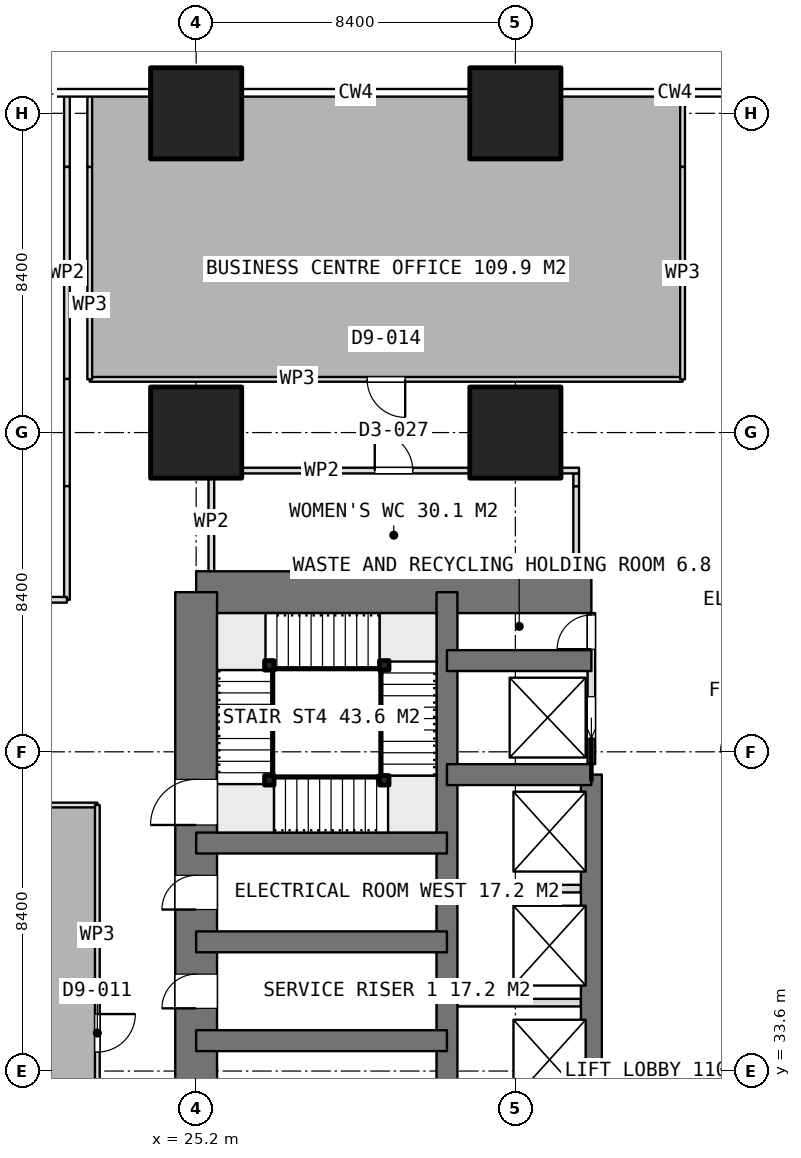
"""IFC4 building model, lengths in metres.
Left out: names, types, materials, properties, quantities, classifications, styles, units other than length and angle.
Written with IfcOpenShell. Run it as: python <this file> out.ifc"""

import sys

from ifc_helpers import new_model, si_unit, direction, frame, frame_2d, origin, origin_2d, place, context, subcontext, project, spatial, rectangle, extrude, element, fill, save


model = new_model("IFC4")
c1 = context("Model", 3, precision=1e-05, world=origin(), true_north=direction((0.0, 1.0)))
c2 = subcontext(c1, "Body", "Model", "MODEL_VIEW")
j1 = project(units=[si_unit("LENGTHUNIT", "METRE"), si_unit("PLANEANGLEUNIT", "RADIAN")], contexts=[c1])
p1 = place(None, origin())
s1 = spatial("IfcSite", under=j1, at=p1, CompositionType="ELEMENT")
p2 = place(p1, origin())
s2 = spatial("IfcBuilding", under=s1, at=p2, CompositionType="ELEMENT")
p3 = place(p2, frame((0.0, 0.0, 20.4)))
s3 = spatial("IfcBuildingStorey", under=s2, at=p3, CompositionType="ELEMENT", Elevation=20.4)
p4 = place(p3, frame((25.2, 46.2, 0.0), z_axis=(0.0, 0.0, 1.0), x_axis=(1.0, 0.0, 0.0)))
e1 = element("IfcWall", 1, at=p4, inside=s3, PredefinedType="SHEAR", context=c2, shape_type="SweptSolid", body=[
    extrude(rectangle(XDim=10.4, YDim=1.1, at=frame_2d((5.2, 0.0))), origin(), (0.0, 0.0, 1.0), 5.0),
])
p5 = place(p3, frame((25.2, 21.0, 0.0), z_axis=(0.0, 0.0, 1.0), x_axis=(0.0, 1.0, 0.0)))
e2 = element("IfcWall", 2, at=p5, inside=s3, PredefinedType="SHEAR", context=c2, shape_type="SweptSolid", body=[
    extrude(rectangle(XDim=25.2, YDim=1.1, at=frame_2d((12.6, 0.0))), origin(), (0.0, 0.0, 1.0), 5.0),
])
p6 = place(p5, frame((7.8, 0.0, 0.0)))
e3 = element("IfcOpeningElement", 3, at=p6, cuts=e2, PredefinedType="OPENING", context=c2, shape_type="SweptSolid", body=[
    extrude(rectangle(XDim=1.2, YDim=2.1, at=frame_2d((0.6, 1.05))), frame((0.0, 0.56, 0.0), z_axis=(0.0, -1.0, 0.0), x_axis=(1.0, 0.0, 0.0)), (0.0, 0.0, 1.0), 1.12),
])
p7 = place(p5, frame((14.25, 0.0, 0.0)))
e4 = element("IfcOpeningElement", 4, at=p7, cuts=e2, PredefinedType="OPENING", context=c2, shape_type="SweptSolid", body=[
    extrude(rectangle(XDim=0.9, YDim=2.1, at=frame_2d((0.45, 1.05))), frame((0.0, 0.56, 0.0), z_axis=(0.0, -1.0, 0.0), x_axis=(1.0, 0.0, 0.0)), (0.0, 0.0, 1.0), 1.12),
])
p8 = place(p5, frame((16.85, 0.0, 0.0)))
e5 = element("IfcOpeningElement", 5, at=p8, cuts=e2, PredefinedType="OPENING", context=c2, shape_type="SweptSolid", body=[
    extrude(rectangle(XDim=0.9, YDim=2.1, at=frame_2d((0.45, 1.05))), frame((0.0, 0.56, 0.0), z_axis=(0.0, -1.0, 0.0), x_axis=(1.0, 0.0, 0.0)), (0.0, 0.0, 1.0), 1.12),
])
p9 = place(p5, frame((19.075, 0.0, 0.0)))
e6 = element("IfcOpeningElement", 6, at=p9, cuts=e2, PredefinedType="OPENING", context=c2, shape_type="SweptSolid", body=[
    extrude(rectangle(XDim=1.2, YDim=2.1, at=frame_2d((0.6, 1.05))), frame((0.0, 0.56, 0.0), z_axis=(0.0, -1.0, 0.0), x_axis=(1.0, 0.0, 0.0)), (0.0, 0.0, 1.0), 1.12),
])
p10 = place(p3, frame((31.8, 21.0, 0.0), z_axis=(0.0, 0.0, 1.0), x_axis=(0.0, 1.0, 0.0)))
e7 = element("IfcWall", 7, at=p10, inside=s3, PredefinedType="SHEAR", context=c2, shape_type="SweptSolid", body=[
    extrude(rectangle(XDim=25.2, YDim=0.55, at=frame_2d((12.6, 0.0))), origin(), (0.0, 0.0, 1.0), 5.0),
])
p11 = place(p3, frame((35.6, 23.4, 0.0), z_axis=(0.0, 0.0, 1.0), x_axis=(0.0, 1.0, 0.0)))
e8 = element("IfcWall", 8, at=p11, inside=s3, PredefinedType="SHEAR", context=c2, shape_type="SweptSolid", body=[
    extrude(rectangle(XDim=18.0, YDim=0.55, at=frame_2d((9.0, 0.0))), origin(), (0.0, 0.0, 1.0), 5.0),
])
for number, where, z_axis, x_axis in (
    (9, (31.8, 41.4, 0.0), (0.0, 0.0, 1.0), (1.0, 0.0, 0.0)),
    (10, (31.8, 44.4, 0.0), (0.0, 0.0, 1.0), (1.0, 0.0, 0.0)),
):
    element("IfcWall", number, at=place(p3, frame(where, z_axis=z_axis, x_axis=x_axis)), inside=s3, PredefinedType="SHEAR", context=c2, shape_type="SweptSolid", body=[
        extrude(rectangle(XDim=3.8, YDim=0.55, at=frame_2d((1.9, 0.0))), origin(), (0.0, 0.0, 1.0), 5.0),
    ])
for number, where, z_axis, x_axis in (
    (11, (25.2, 34.4, 0.0), (0.0, 0.0, 1.0), (1.0, 0.0, 0.0)),
    (12, (25.2, 37.0, 0.0), (0.0, 0.0, 1.0), (1.0, 0.0, 0.0)),
    (13, (25.2, 39.6, 0.0), (0.0, 0.0, 1.0), (1.0, 0.0, 0.0)),
):
    element("IfcWall", number, at=place(p3, frame(where, z_axis=z_axis, x_axis=x_axis)), inside=s3, PredefinedType="SHEAR", context=c2, shape_type="SweptSolid", body=[
        extrude(rectangle(XDim=6.6, YDim=0.55, at=frame_2d((3.3, 0.0))), origin(), (0.0, 0.0, 1.0), 5.0),
    ])
for number, where, z_axis, x_axis in (
    (14, (25.2, 50.4, 0.0), (0.0, 0.0, 1.0), (1.0, 0.0, 0.0)),
    (15, (25.2, 58.8, 0.0), (0.0, 0.0, 1.0), (1.0, 0.0, 0.0)),
    (16, (33.6, 50.4, 0.0), (0.0, 0.0, 1.0), (1.0, 0.0, 0.0)),
    (17, (33.6, 58.8, 0.0), (0.0, 0.0, 1.0), (1.0, 0.0, 0.0)),
):
    element("IfcColumn", number, at=place(p3, frame(where, z_axis=z_axis, x_axis=x_axis)), inside=s3, PredefinedType="COLUMN", context=c2, shape_type="SweptSolid", body=[
        extrude(rectangle(XDim=2.4, YDim=2.4, at=origin_2d()), origin(), (0.0, 0.0, 1.0), 5.0),
    ])
for number, where, z_axis, x_axis in (
    (18, (32.075, 35.4, 0.0), (0.0, 0.0, 1.0), (1.0, 0.0, 0.0)),
    (19, (32.075, 38.4, 0.0), (0.0, 0.0, 1.0), (1.0, 0.0, 0.0)),
):
    element("IfcWall", number, at=place(p3, frame(where, z_axis=z_axis, x_axis=x_axis)), inside=s3, PredefinedType="PARTITIONING", context=c2, shape_type="SweptSolid", body=[
        extrude(rectangle(XDim=3.25, YDim=0.2, at=frame_2d((1.625, 0.0))), origin(), (0.0, 0.0, 1.0), 4.6),
    ])
p12 = place(p3, frame((35.6, 41.675, 0.0), z_axis=(0.0, 0.0, 1.0), x_axis=(0.0, 1.0, 0.0)))
e20 = element("IfcWall", 20, at=p12, inside=s3, PredefinedType="PARTITIONING", context=c2, shape_type="SweptSolid", body=[
    extrude(rectangle(XDim=3.975, YDim=0.2, at=frame_2d((1.987, 0.0))), origin(), (0.0, 0.0, 1.0), 4.6),
])
p13 = place(p12, frame((3.025, 0.0, 0.0)))
e21 = element("IfcOpeningElement", 21, at=p13, cuts=e20, PredefinedType="OPENING", context=c2, shape_type="SweptSolid", body=[
    extrude(rectangle(XDim=0.9, YDim=2.1, at=frame_2d((0.45, 1.05))), frame((0.0, 0.11, 0.0), z_axis=(0.0, -1.0, 0.0), x_axis=(1.0, 0.0, 0.0)), (0.0, 0.0, 1.0), 0.22),
])
p14 = place(p12, frame((0.675, 0.0, 0.0)))
e22 = element("IfcOpeningElement", 22, at=p14, cuts=e20, PredefinedType="OPENING", context=c2, shape_type="SweptSolid", body=[
    extrude(rectangle(XDim=1.1, YDim=2.1, at=frame_2d((0.55, 1.05))), frame((0.0, 0.11, 0.0), z_axis=(0.0, -1.0, 0.0), x_axis=(1.0, 0.0, 0.0)), (0.0, 0.0, 1.0), 0.22),
])
p15 = place(p3, frame((25.525, 49.4, 0.0), z_axis=(0.0, 0.0, 1.0), x_axis=(1.0, 0.0, 0.0)))
e23 = element("IfcWall", 23, at=p15, inside=s3, PredefinedType="PARTITIONING", context=c2, shape_type="SweptSolid", body=[
    extrude(rectangle(XDim=0.875, YDim=0.15, at=frame_2d((0.438, 0.0))), origin(), (0.0, 0.0, 1.0), 4.6),
])
p16 = place(p3, frame((26.4, 49.4, 0.0), z_axis=(0.0, 0.0, 1.0), x_axis=(1.0, 0.0, 0.0)))
e24 = element("IfcWall", 24, at=p16, inside=s3, PredefinedType="PARTITIONING", context=c2, shape_type="SweptSolid", body=[
    extrude(rectangle(XDim=6.0, YDim=0.15, at=frame_2d((3.0, 0.0))), origin(), (0.0, 0.0, 1.0), 2.8),
])
p17 = place(p16, frame((3.5, 0.0, 0.0)))
e25 = element("IfcOpeningElement", 25, at=p17, cuts=e24, PredefinedType="OPENING", context=c2, shape_type="SweptSolid", body=[
    extrude(rectangle(XDim=1.0, YDim=2.1, at=frame_2d((0.5, 1.05))), frame((0.0, 0.085, 0.0), z_axis=(0.0, -1.0, 0.0), x_axis=(1.0, 0.0, 0.0)), (0.0, 0.0, 1.0), 0.17),
])
p18 = place(p3, frame((32.4, 49.4, 0.0), z_axis=(0.0, 0.0, 1.0), x_axis=(1.0, 0.0, 0.0)))
e26 = element("IfcWall", 26, at=p18, inside=s3, PredefinedType="PARTITIONING", context=c2, shape_type="SweptSolid", body=[
    extrude(rectangle(XDim=2.4, YDim=0.15, at=frame_2d((1.2, 0.0))), origin(), (0.0, 0.0, 1.0), 4.6),
])
p19 = place(p3, frame((34.8, 49.4, 0.0), z_axis=(0.0, 0.0, 1.0), x_axis=(1.0, 0.0, 0.0)))
e27 = element("IfcWall", 27, at=p19, inside=s3, PredefinedType="PARTITIONING", context=c2, shape_type="SweptSolid", body=[
    extrude(rectangle(XDim=0.475, YDim=0.15, at=frame_2d((0.237, 0.0))), origin(), (0.0, 0.0, 1.0), 2.8),
])
p20 = place(p3, frame((25.6, 46.75, 0.0), z_axis=(0.0, 0.0, 1.0), x_axis=(0.0, 1.0, 0.0)))
e28 = element("IfcWall", 28, at=p20, inside=s3, PredefinedType="PARTITIONING", context=c2, shape_type="SweptSolid", body=[
    extrude(rectangle(XDim=2.575, YDim=0.15, at=frame_2d((1.288, 0.0))), origin(), (0.0, 0.0, 1.0), 4.6),
])
p21 = place(p3, frame((35.2, 46.75, 0.0), z_axis=(0.0, 0.0, 1.0), x_axis=(0.0, 1.0, 0.0)))
e29 = element("IfcWall", 29, at=p21, inside=s3, PredefinedType="PARTITIONING", context=c2, shape_type="SweptSolid", body=[
    extrude(rectangle(XDim=2.24, YDim=0.15, at=frame_2d((1.12, 0.0))), origin(), (0.0, 0.0, 1.0), 4.6),
])
p22 = place(p3, frame((35.2, 48.99, 0.0), z_axis=(0.0, 0.0, 1.0), x_axis=(0.0, 1.0, 0.0)))
e30 = element("IfcWall", 30, at=p22, inside=s3, PredefinedType="PARTITIONING", context=c2, shape_type="SweptSolid", body=[
    extrude(rectangle(XDim=0.335, YDim=0.15, at=frame_2d((0.167, 0.0))), origin(), (0.0, 0.0, 1.0), 2.8),
])
p23 = place(p3, frame((21.8, 59.29, 0.0), z_axis=(0.0, 0.0, 1.0), x_axis=(0.0, -1.0, 0.0)))
e31 = element("IfcWall", 31, at=p23, inside=s3, PredefinedType="PARTITIONING", context=c2, shape_type="SweptSolid", body=[
    extrude(rectangle(XDim=1.9, YDim=0.15, at=frame_2d((0.95, 0.0))), origin(), (0.0, 0.0, 1.0), 2.8),
])
p24 = place(p3, frame((21.8, 57.39, 0.0), z_axis=(0.0, 0.0, 1.0), x_axis=(0.0, -1.0, 0.0)))
e32 = element("IfcWall", 32, at=p24, inside=s3, PredefinedType="PARTITIONING", context=c2, shape_type="SweptSolid", body=[
    extrude(rectangle(XDim=5.58, YDim=0.15, at=frame_2d((2.79, 0.0))), origin(), (0.0, 0.0, 1.0), 4.6),
])
p25 = place(p3, frame((21.8, 51.81, 0.0), z_axis=(0.0, 0.0, 1.0), x_axis=(0.0, -1.0, 0.0)))
e33 = element("IfcWall", 33, at=p25, inside=s3, PredefinedType="PARTITIONING", context=c2, shape_type="SweptSolid", body=[
    extrude(rectangle(XDim=2.82, YDim=0.15, at=frame_2d((1.41, 0.0))), origin(), (0.0, 0.0, 1.0), 2.8),
])
p26 = place(p3, frame((21.8, 48.99, 0.0), z_axis=(0.0, 0.0, 1.0), x_axis=(0.0, -1.0, 0.0)))
e34 = element("IfcWall", 34, at=p26, inside=s3, PredefinedType="PARTITIONING", context=c2, shape_type="SweptSolid", body=[
    extrude(rectangle(XDim=2.99, YDim=0.15, at=frame_2d((1.495, 0.0))), origin(), (0.0, 0.0, 1.0), 4.6),
])
p27 = place(p3, frame((21.8, 46.0, 0.0), z_axis=(0.0, 0.0, 1.0), x_axis=(-1.0, 0.0, 0.0)))
e35 = element("IfcWall", 35, at=p27, inside=s3, PredefinedType="PARTITIONING", context=c2, shape_type="SweptSolid", body=[
    extrude(rectangle(XDim=3.59, YDim=0.15, at=frame_2d((1.795, 0.0))), origin(), (0.0, 0.0, 1.0), 4.6),
])
p28 = place(p3, frame((18.21, 40.6, 0.0), z_axis=(0.0, 0.0, 1.0), x_axis=(1.0, 0.0, 0.0)))
e36 = element("IfcWall", 36, at=p28, inside=s3, PredefinedType="PARTITIONING", context=c2, shape_type="SweptSolid", body=[
    extrude(rectangle(XDim=4.39, YDim=0.125, at=frame_2d((2.195, 0.0))), origin(), (0.0, 0.0, 1.0), 4.6),
])
p29 = place(p3, frame((22.6, 40.6, 0.0), z_axis=(0.0, 0.0, 1.0), x_axis=(0.0, -1.0, 0.0)))
e37 = element("IfcWall", 37, at=p29, inside=s3, PredefinedType="PARTITIONING", context=c2, shape_type="SweptSolid", body=[
    extrude(rectangle(XDim=9.8, YDim=0.125, at=frame_2d((4.9, 0.0))), origin(), (0.0, 0.0, 1.0), 4.6),
])
p30 = place(p29, frame((5.5, 0.0, 0.0)))
e38 = element("IfcOpeningElement", 38, at=p30, cuts=e37, PredefinedType="OPENING", context=c2, shape_type="SweptSolid", body=[
    extrude(rectangle(XDim=1.0, YDim=2.1, at=frame_2d((0.5, 1.05))), frame((0.0, 0.073, 0.0), z_axis=(0.0, -1.0, 0.0), x_axis=(1.0, 0.0, 0.0)), (0.0, 0.0, 1.0), 0.145),
])
p31 = place(p3, frame((38.0, 51.8, 0.0), z_axis=(0.0, 0.0, 1.0), x_axis=(-1.0, 0.0, 0.0)))
e39 = element("IfcWall", 39, at=p31, inside=s3, PredefinedType="PARTITIONING", context=c2, shape_type="SweptSolid", body=[
    extrude(rectangle(XDim=15.6, YDim=0.125, at=frame_2d((7.8, 0.0))), origin(), (0.0, 0.0, 1.0), 2.8),
])
p32 = place(p31, frame((7.3, 0.0, 0.0)))
e40 = element("IfcOpeningElement", 40, at=p32, cuts=e39, PredefinedType="OPENING", context=c2, shape_type="SweptSolid", body=[
    extrude(rectangle(XDim=1.0, YDim=2.1, at=frame_2d((0.5, 1.05))), frame((0.0, 0.073, 0.0), z_axis=(0.0, -1.0, 0.0), x_axis=(1.0, 0.0, 0.0)), (0.0, 0.0, 1.0), 0.145),
])
p33 = place(p3, frame((22.4, 51.8, 0.0), z_axis=(0.0, 0.0, 1.0), x_axis=(0.0, 1.0, 0.0)))
e41 = element("IfcWall", 41, at=p33, inside=s3, PredefinedType="PARTITIONING", context=c2, shape_type="SweptSolid", body=[
    extrude(rectangle(XDim=5.59, YDim=0.125, at=frame_2d((2.795, 0.0))), origin(), (0.0, 0.0, 1.0), 2.8),
])
for number, where, z_axis, x_axis in (
    (42, (22.4, 57.39, 0.0), (0.0, 0.0, 1.0), (0.0, 1.0, 0.0)),
    (43, (38.0, 59.29, 0.0), (0.0, 0.0, 1.0), (0.0, -1.0, 0.0)),
):
    element("IfcWall", number, at=place(p3, frame(where, z_axis=z_axis, x_axis=x_axis)), inside=s3, PredefinedType="PARTITIONING", context=c2, shape_type="SweptSolid", body=[
        extrude(rectangle(XDim=1.9, YDim=0.125, at=frame_2d((0.95, 0.0))), origin(), (0.0, 0.0, 1.0), 2.8),
    ])
p34 = place(p3, frame((38.0, 57.39, 0.0), z_axis=(0.0, 0.0, 1.0), x_axis=(0.0, -1.0, 0.0)))
e44 = element("IfcWall", 44, at=p34, inside=s3, PredefinedType="PARTITIONING", context=c2, shape_type="SweptSolid", body=[
    extrude(rectangle(XDim=5.59, YDim=0.125, at=frame_2d((2.795, 0.0))), origin(), (0.0, 0.0, 1.0), 2.8),
])
for number, where, z_axis, x_axis in (
    (45, (27.125, 41.25, 0.0), (0.0, 0.0, 1.0), (1.0, 0.0, 0.0)),
    (46, (30.15, 41.25, 0.0), (0.0, 0.0, 1.0), (1.0, 0.0, 0.0)),
    (47, (30.15, 44.275, 0.0), (0.0, 0.0, 1.0), (1.0, 0.0, 0.0)),
    (48, (27.125, 44.275, 0.0), (0.0, 0.0, 1.0), (1.0, 0.0, 0.0)),
):
    element("IfcColumn", number, at=place(p3, frame(where, z_axis=z_axis, x_axis=x_axis)), inside=s3, PredefinedType="COLUMN", context=c2, shape_type="SweptSolid", body=[
        extrude(rectangle(XDim=0.25, YDim=0.25, at=origin_2d()), origin(), (0.0, 0.0, 1.0), 5.0),
    ])
p35 = place(p7, origin())
e49 = element("IfcDoor", 49, at=p35, inside=s3, OperationType="SINGLE_SWING_LEFT", PredefinedType="DOOR", context=c2, shape_type="SweptSolid", body=[
    extrude(rectangle(XDim=0.9, YDim=2.1, at=frame_2d((0.45, 1.05))), frame((0.0, 0.025, 0.0), z_axis=(0.0, -1.0, 0.0), x_axis=(1.0, 0.0, 0.0)), (0.0, 0.0, 1.0), 0.05),
])
fill(e4, e49)
p36 = place(p8, origin())
e50 = element("IfcDoor", 50, at=p36, inside=s3, OperationType="SINGLE_SWING_LEFT", PredefinedType="DOOR", context=c2, shape_type="SweptSolid", body=[
    extrude(rectangle(XDim=0.9, YDim=2.1, at=frame_2d((0.45, 1.05))), frame((0.0, 0.025, 0.0), z_axis=(0.0, -1.0, 0.0), x_axis=(1.0, 0.0, 0.0)), (0.0, 0.0, 1.0), 0.05),
])
fill(e5, e50)
p37 = place(p13, origin())
e51 = element("IfcDoor", 51, at=p37, inside=s3, OperationType="SINGLE_SWING_LEFT", PredefinedType="DOOR", context=c2, shape_type="SweptSolid", body=[
    extrude(rectangle(XDim=0.9, YDim=2.1, at=frame_2d((0.45, 1.05))), frame((0.0, 0.025, 0.0), z_axis=(0.0, -1.0, 0.0), x_axis=(1.0, 0.0, 0.0)), (0.0, 0.0, 1.0), 0.05),
])
fill(e21, e51)
p38 = place(p14, origin())
e52 = element("IfcDoor", 52, at=p38, inside=s3, OperationType="SLIDING_TO_LEFT", PredefinedType="USERDEFINED", context=c2, shape_type="SweptSolid", body=[
    extrude(rectangle(XDim=1.1, YDim=2.1, at=frame_2d((0.55, 1.05))), frame((0.0, 0.025, 0.0), z_axis=(0.0, -1.0, 0.0), x_axis=(1.0, 0.0, 0.0)), (0.0, 0.0, 1.0), 0.05),
])
fill(e22, e52)
p39 = place(p17, origin())
e53 = element("IfcDoor", 53, at=p39, inside=s3, OperationType="SINGLE_SWING_LEFT", PredefinedType="DOOR", context=c2, shape_type="SweptSolid", body=[
    extrude(rectangle(XDim=1.0, YDim=2.1, at=frame_2d((0.5, 1.05))), frame((0.0, 0.025, 0.0), z_axis=(0.0, -1.0, 0.0), x_axis=(1.0, 0.0, 0.0)), (0.0, 0.0, 1.0), 0.05),
])
fill(e25, e53)
p40 = place(p30, origin())
e54 = element("IfcDoor", 54, at=p40, inside=s3, OperationType="SINGLE_SWING_LEFT", PredefinedType="DOOR", context=c2, shape_type="SweptSolid", body=[
    extrude(rectangle(XDim=1.0, YDim=2.1, at=frame_2d((0.5, 1.05))), frame((0.0, 0.025, 0.0), z_axis=(0.0, -1.0, 0.0), x_axis=(1.0, 0.0, 0.0)), (0.0, 0.0, 1.0), 0.05),
])
fill(e38, e54)
p41 = place(p32, origin())
e55 = element("IfcDoor", 55, at=p41, inside=s3, OperationType="SINGLE_SWING_LEFT", PredefinedType="DOOR", context=c2, shape_type="SweptSolid", body=[
    extrude(rectangle(XDim=1.0, YDim=2.1, at=frame_2d((0.5, 1.05))), frame((0.0, 0.025, 0.0), z_axis=(0.0, -1.0, 0.0), x_axis=(1.0, 0.0, 0.0)), (0.0, 0.0, 1.0), 0.05),
])
fill(e40, e55)
p42 = place(p9, origin())
e56 = element("IfcDoor", 56, at=p42, inside=s3, OperationType="SINGLE_SWING_RIGHT", PredefinedType="DOOR", context=c2, shape_type="SweptSolid", body=[
    extrude(rectangle(XDim=1.2, YDim=2.1, at=frame_2d((0.6, 1.05))), frame((0.0, 0.025, 0.0), z_axis=(0.0, -1.0, 0.0), x_axis=(1.0, 0.0, 0.0)), (0.0, 0.0, 1.0), 0.05),
])
fill(e6, e56)
save(model, sys.argv[1])
